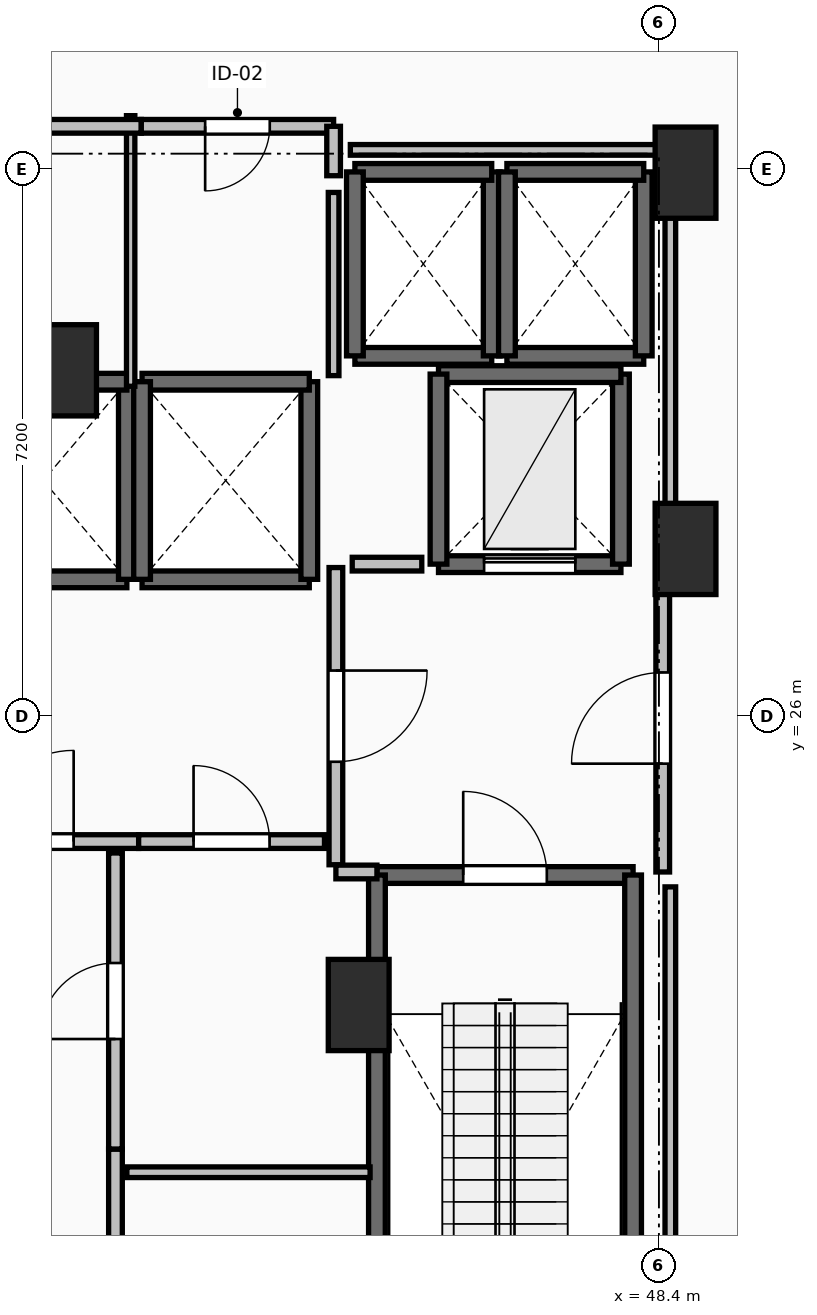
"""IFC4 building model, lengths in metres.
Left out: names, types, materials, properties, quantities, classifications, styles, units other than length and angle.
Written with IfcOpenShell. Run it as: python <this file> out.ifc"""

import sys

from ifc_helpers import new_model, si_unit, direction, frame, frame_2d, origin, origin_2d, place, context, subcontext, project, spatial, rectangle, extrude, element, fill, save


model = new_model("IFC4")
c1 = context("Model", 3, precision=1e-05, world=origin(), true_north=direction((0.0, 1.0)))
c2 = subcontext(c1, "Body", "Model", "MODEL_VIEW")
j1 = project(units=[si_unit("LENGTHUNIT", "METRE"), si_unit("PLANEANGLEUNIT", "RADIAN")], contexts=[c1])
p1 = place(None, origin())
s1 = spatial("IfcSite", under=j1, at=p1, CompositionType="ELEMENT")
p2 = place(p1, origin())
s2 = spatial("IfcBuilding", under=s1, at=p2, CompositionType="ELEMENT")
p3 = place(p2, frame((0.0, 0.0, 9.6)))
s3 = spatial("IfcBuildingStorey", under=s2, at=p3, CompositionType="ELEMENT", Elevation=9.6)
for number, where, z_axis, x_axis in (
    (1, (48.75, 33.15, 0.0), (0.0, 0.0, 1.0), (1.0, 0.0, 0.0)),
    (2, (48.75, 28.2, 0.0), (0.0, 0.0, 1.0), (1.0, 0.0, 0.0)),
    (3, (44.45, 22.2, 0.0), (0.0, 0.0, 1.0), (1.0, 0.0, 0.0)),
    (4, (40.6, 30.55, 0.0), (0.0, 0.0, 1.0), (1.0, 0.0, 0.0)),
):
    element("IfcColumn", number, at=place(p3, frame(where, z_axis=z_axis, x_axis=x_axis)), inside=s3, PredefinedType="PILASTER", context=c2, shape_type="SweptSolid", body=[
        extrude(rectangle(XDim=0.8, YDim=1.2, at=origin_2d()), origin(), (0.0, 0.0, 1.0), 4.8),
    ])
p4 = place(p3, frame((44.69, 23.91, 0.0), z_axis=(0.0, 0.0, 1.0), x_axis=(1.0, 0.0, 0.0)))
e5 = element("IfcWall", 5, at=p4, inside=s3, PredefinedType="SOLIDWALL", context=c2, shape_type="SweptSolid", body=[
    extrude(rectangle(XDim=3.37, YDim=0.22, at=frame_2d((1.685, 0.0))), origin(), (0.0, 0.0, 1.0), 4.48),
])
p5 = place(p4, frame((1.135, 0.0, 0.0)))
e6 = element("IfcOpeningElement", 6, at=p5, cuts=e5, PredefinedType="OPENING", context=c2, shape_type="SweptSolid", body=[
    extrude(rectangle(XDim=1.1, YDim=2.15, at=frame_2d((0.55, 1.075))), frame((0.0, 0.125, 0.0), z_axis=(0.0, -1.0, 0.0), x_axis=(1.0, 0.0, 0.0)), (0.0, 0.0, 1.0), 0.25),
])
for number, where, z_axis, x_axis in (
    (7, (48.06, 23.91, 0.0), (0.0, 0.0, 1.0), (0.0, -1.0, 0.0)),
    (8, (44.69, 16.49, 0.0), (0.0, 0.0, 1.0), (0.0, 1.0, 0.0)),
):
    element("IfcWall", number, at=place(p3, frame(where, z_axis=z_axis, x_axis=x_axis)), inside=s3, PredefinedType="SOLIDWALL", context=c2, shape_type="SweptSolid", body=[
        extrude(rectangle(XDim=7.42, YDim=0.22, at=frame_2d((3.71, 0.0))), origin(), (0.0, 0.0, 1.0), 4.48),
    ])
p6 = place(p3, frame((39.2, 27.8, 0.0), z_axis=(0.0, 0.0, 1.0), x_axis=(1.0, 0.0, 0.0)))
e9 = element("IfcWall", 9, at=p6, inside=s3, PredefinedType="SOLIDWALL", context=c2, shape_type="SweptSolid", body=[
    extrude(rectangle(XDim=2.2, YDim=0.22, at=frame_2d((1.1, 0.0))), origin(), (0.0, 0.0, 1.0), 4.48),
])
p7 = place(p3, frame((41.4, 27.8, 0.0), z_axis=(0.0, 0.0, 1.0), x_axis=(0.0, 1.0, 0.0)))
e10 = element("IfcWall", 10, at=p7, inside=s3, PredefinedType="SOLIDWALL", context=c2, shape_type="SweptSolid", body=[
    extrude(rectangle(XDim=2.6, YDim=0.22, at=frame_2d((1.3, 0.0))), origin(), (0.0, 0.0, 1.0), 4.48),
])
for number, where, z_axis, x_axis in (
    (11, (41.4, 30.4, 0.0), (0.0, 0.0, 1.0), (-1.0, 0.0, 0.0)),
    (12, (41.6, 27.8, 0.0), (0.0, 0.0, 1.0), (1.0, 0.0, 0.0)),
):
    element("IfcWall", number, at=place(p3, frame(where, z_axis=z_axis, x_axis=x_axis)), inside=s3, PredefinedType="SOLIDWALL", context=c2, shape_type="SweptSolid", body=[
        extrude(rectangle(XDim=2.2, YDim=0.22, at=frame_2d((1.1, 0.0))), origin(), (0.0, 0.0, 1.0), 4.48),
    ])
p8 = place(p3, frame((43.8, 27.8, 0.0), z_axis=(0.0, 0.0, 1.0), x_axis=(0.0, 1.0, 0.0)))
e13 = element("IfcWall", 13, at=p8, inside=s3, PredefinedType="SOLIDWALL", context=c2, shape_type="SweptSolid", body=[
    extrude(rectangle(XDim=2.6, YDim=0.22, at=frame_2d((1.3, 0.0))), origin(), (0.0, 0.0, 1.0), 4.48),
])
p9 = place(p3, frame((43.8, 30.4, 0.0), z_axis=(0.0, 0.0, 1.0), x_axis=(-1.0, 0.0, 0.0)))
e14 = element("IfcWall", 14, at=p9, inside=s3, PredefinedType="SOLIDWALL", context=c2, shape_type="SweptSolid", body=[
    extrude(rectangle(XDim=2.2, YDim=0.22, at=frame_2d((1.1, 0.0))), origin(), (0.0, 0.0, 1.0), 4.48),
])
p10 = place(p3, frame((41.6, 30.4, 0.0), z_axis=(0.0, 0.0, 1.0), x_axis=(0.0, -1.0, 0.0)))
e15 = element("IfcWall", 15, at=p10, inside=s3, PredefinedType="SOLIDWALL", context=c2, shape_type="SweptSolid", body=[
    extrude(rectangle(XDim=2.6, YDim=0.22, at=frame_2d((1.3, 0.0))), origin(), (0.0, 0.0, 1.0), 4.48),
])
p11 = place(p3, frame((44.4, 30.74, 0.0), z_axis=(0.0, 0.0, 1.0), x_axis=(1.0, 0.0, 0.0)))
e16 = element("IfcWall", 16, at=p11, inside=s3, PredefinedType="SOLIDWALL", context=c2, shape_type="SweptSolid", body=[
    extrude(rectangle(XDim=1.8, YDim=0.22, at=frame_2d((0.9, 0.0))), origin(), (0.0, 0.0, 1.0), 4.48),
])
p12 = place(p3, frame((46.2, 30.74, 0.0), z_axis=(0.0, 0.0, 1.0), x_axis=(0.0, 1.0, 0.0)))
e17 = element("IfcWall", 17, at=p12, inside=s3, PredefinedType="SOLIDWALL", context=c2, shape_type="SweptSolid", body=[
    extrude(rectangle(XDim=2.42, YDim=0.22, at=frame_2d((1.21, 0.0))), origin(), (0.0, 0.0, 1.0), 4.48),
])
p13 = place(p3, frame((46.2, 33.16, 0.0), z_axis=(0.0, 0.0, 1.0), x_axis=(-1.0, 0.0, 0.0)))
e18 = element("IfcWall", 18, at=p13, inside=s3, PredefinedType="SOLIDWALL", context=c2, shape_type="SweptSolid", body=[
    extrude(rectangle(XDim=1.8, YDim=0.22, at=frame_2d((0.9, 0.0))), origin(), (0.0, 0.0, 1.0), 4.48),
])
p14 = place(p3, frame((44.4, 33.16, 0.0), z_axis=(0.0, 0.0, 1.0), x_axis=(0.0, -1.0, 0.0)))
e19 = element("IfcWall", 19, at=p14, inside=s3, PredefinedType="SOLIDWALL", context=c2, shape_type="SweptSolid", body=[
    extrude(rectangle(XDim=2.42, YDim=0.22, at=frame_2d((1.21, 0.0))), origin(), (0.0, 0.0, 1.0), 4.48),
])
p15 = place(p3, frame((46.4, 30.74, 0.0), z_axis=(0.0, 0.0, 1.0), x_axis=(1.0, 0.0, 0.0)))
e20 = element("IfcWall", 20, at=p15, inside=s3, PredefinedType="SOLIDWALL", context=c2, shape_type="SweptSolid", body=[
    extrude(rectangle(XDim=1.8, YDim=0.22, at=frame_2d((0.9, 0.0))), origin(), (0.0, 0.0, 1.0), 4.48),
])
p16 = place(p3, frame((48.2, 30.74, 0.0), z_axis=(0.0, 0.0, 1.0), x_axis=(0.0, 1.0, 0.0)))
e21 = element("IfcWall", 21, at=p16, inside=s3, PredefinedType="SOLIDWALL", context=c2, shape_type="SweptSolid", body=[
    extrude(rectangle(XDim=2.42, YDim=0.22, at=frame_2d((1.21, 0.0))), origin(), (0.0, 0.0, 1.0), 4.48),
])
p17 = place(p3, frame((48.2, 33.16, 0.0), z_axis=(0.0, 0.0, 1.0), x_axis=(-1.0, 0.0, 0.0)))
e22 = element("IfcWall", 22, at=p17, inside=s3, PredefinedType="SOLIDWALL", context=c2, shape_type="SweptSolid", body=[
    extrude(rectangle(XDim=1.8, YDim=0.22, at=frame_2d((0.9, 0.0))), origin(), (0.0, 0.0, 1.0), 4.48),
])
p18 = place(p3, frame((46.4, 33.16, 0.0), z_axis=(0.0, 0.0, 1.0), x_axis=(0.0, -1.0, 0.0)))
e23 = element("IfcWall", 23, at=p18, inside=s3, PredefinedType="SOLIDWALL", context=c2, shape_type="SweptSolid", body=[
    extrude(rectangle(XDim=2.42, YDim=0.22, at=frame_2d((1.21, 0.0))), origin(), (0.0, 0.0, 1.0), 4.48),
])
p19 = place(p3, frame((45.5, 28.0, 0.0), z_axis=(0.0, 0.0, 1.0), x_axis=(1.0, 0.0, 0.0)))
e24 = element("IfcWall", 24, at=p19, inside=s3, PredefinedType="SHEAR", context=c2, shape_type="SweptSolid", body=[
    extrude(rectangle(XDim=2.4, YDim=0.22, at=frame_2d((1.2, 0.0))), origin(), (0.0, 0.0, 1.0), 4.48),
])
p20 = place(p19, frame((0.6, 0.0, 0.0)))
e25 = element("IfcOpeningElement", 25, at=p20, cuts=e24, PredefinedType="OPENING", context=c2, shape_type="SweptSolid", body=[
    extrude(rectangle(XDim=1.2, YDim=2.2, at=frame_2d((0.6, 1.1))), frame((0.0, 0.125, 0.0), z_axis=(0.0, -1.0, 0.0), x_axis=(1.0, 0.0, 0.0)), (0.0, 0.0, 1.0), 0.25),
])
p21 = place(p3, frame((47.9, 28.0, 0.0), z_axis=(0.0, 0.0, 1.0), x_axis=(0.0, 1.0, 0.0)))
e26 = element("IfcWall", 26, at=p21, inside=s3, PredefinedType="SHEAR", context=c2, shape_type="SweptSolid", body=[
    extrude(rectangle(XDim=2.5, YDim=0.22, at=frame_2d((1.25, 0.0))), origin(), (0.0, 0.0, 1.0), 4.48),
])
p22 = place(p3, frame((47.9, 30.5, 0.0), z_axis=(0.0, 0.0, 1.0), x_axis=(-1.0, 0.0, 0.0)))
e27 = element("IfcWall", 27, at=p22, inside=s3, PredefinedType="SHEAR", context=c2, shape_type="SweptSolid", body=[
    extrude(rectangle(XDim=2.4, YDim=0.22, at=frame_2d((1.2, 0.0))), origin(), (0.0, 0.0, 1.0), 4.48),
])
p23 = place(p3, frame((45.5, 30.5, 0.0), z_axis=(0.0, 0.0, 1.0), x_axis=(0.0, -1.0, 0.0)))
e28 = element("IfcWall", 28, at=p23, inside=s3, PredefinedType="SHEAR", context=c2, shape_type="SweptSolid", body=[
    extrude(rectangle(XDim=2.5, YDim=0.22, at=frame_2d((1.25, 0.0))), origin(), (0.0, 0.0, 1.0), 4.48),
])
p24 = place(p3, frame((44.15, 27.955, 0.0), z_axis=(0.0, 0.0, 1.0), x_axis=(0.0, -1.0, 0.0)))
e29 = element("IfcWall", 29, at=p24, inside=s3, PredefinedType="PARTITIONING", context=c2, shape_type="SweptSolid", body=[
    extrude(rectangle(XDim=3.91, YDim=0.18, at=frame_2d((1.955, 0.0))), origin(), (0.0, 0.0, 1.0), 4.48),
])
p25 = place(p24, frame((1.355, 0.0, 0.0)))
e30 = element("IfcOpeningElement", 30, at=p25, cuts=e29, PredefinedType="OPENING", context=c2, shape_type="SweptSolid", body=[
    extrude(rectangle(XDim=1.2, YDim=2.15, at=frame_2d((0.6, 1.075))), frame((0.0, 0.105, 0.0), z_axis=(0.0, -1.0, 0.0), x_axis=(1.0, 0.0, 0.0)), (0.0, 0.0, 1.0), 0.21),
])
p26 = place(p3, frame((44.15, 23.95, 0.0), z_axis=(0.0, 0.0, 1.0), x_axis=(1.0, 0.0, 0.0)))
e31 = element("IfcWall", 31, at=p26, inside=s3, PredefinedType="PARTITIONING", context=c2, shape_type="SweptSolid", body=[
    extrude(rectangle(XDim=0.54, YDim=0.18, at=frame_2d((0.27, 0.0))), origin(), (0.0, 0.0, 1.0), 4.48),
])
p27 = place(p3, frame((48.45, 23.95, 0.0), z_axis=(0.0, 0.0, 1.0), x_axis=(0.0, 1.0, 0.0)))
e32 = element("IfcWall", 32, at=p27, inside=s3, PredefinedType="PARTITIONING", context=c2, shape_type="SweptSolid", body=[
    extrude(rectangle(XDim=4.05, YDim=0.18, at=frame_2d((2.025, 0.0))), origin(), (0.0, 0.0, 1.0), 4.48),
])
p28 = place(p27, frame((1.425, 0.0, 0.0)))
e33 = element("IfcOpeningElement", 33, at=p28, cuts=e32, PredefinedType="OPENING", context=c2, shape_type="SweptSolid", body=[
    extrude(rectangle(XDim=1.2, YDim=2.15, at=frame_2d((0.6, 1.075))), frame((0.0, 0.105, 0.0), z_axis=(0.0, -1.0, 0.0), x_axis=(1.0, 0.0, 0.0)), (0.0, 0.0, 1.0), 0.21),
])
p29 = place(p3, frame((38.645, 24.35, 0.0), z_axis=(0.0, 0.0, 1.0), x_axis=(1.0, 0.0, 0.0)))
e34 = element("IfcWall", 34, at=p29, inside=s3, PredefinedType="PARTITIONING", context=c2, shape_type="SweptSolid", body=[
    extrude(rectangle(XDim=2.91, YDim=0.18, at=frame_2d((1.455, 0.0))), origin(), (0.0, 0.0, 1.0), 4.48),
])
p30 = place(p29, frame((0.855, 0.0, 0.0)))
e35 = element("IfcOpeningElement", 35, at=p30, cuts=e34, PredefinedType="OPENING", context=c2, shape_type="SweptSolid", body=[
    extrude(rectangle(XDim=1.2, YDim=2.15, at=frame_2d((0.6, 1.075))), frame((0.0, 0.105, 0.0), z_axis=(0.0, -1.0, 0.0), x_axis=(1.0, 0.0, 0.0)), (0.0, 0.0, 1.0), 0.21),
])
p31 = place(p3, frame((41.555, 24.35, 0.0), z_axis=(0.0, 0.0, 1.0), x_axis=(1.0, 0.0, 0.0)))
e36 = element("IfcWall", 36, at=p31, inside=s3, PredefinedType="PARTITIONING", context=c2, shape_type="SweptSolid", body=[
    extrude(rectangle(XDim=2.445, YDim=0.18, at=frame_2d((1.223, 0.0))), origin(), (0.0, 0.0, 1.0), 4.48),
])
p32 = place(p31, frame((0.722, 0.0, 0.0)))
e37 = element("IfcOpeningElement", 37, at=p32, cuts=e36, PredefinedType="OPENING", context=c2, shape_type="SweptSolid", body=[
    extrude(rectangle(XDim=1.0, YDim=2.15, at=frame_2d((0.5, 1.075))), frame((0.0, 0.105, 0.0), z_axis=(0.0, -1.0, 0.0), x_axis=(1.0, 0.0, 0.0)), (0.0, 0.0, 1.0), 0.21),
])
p33 = place(p3, frame((41.25, 16.32, 0.0), z_axis=(0.0, 0.0, 1.0), x_axis=(0.0, 1.0, 0.0)))
e38 = element("IfcWall", 38, at=p33, inside=s3, PredefinedType="PARTITIONING", context=c2, shape_type="SweptSolid", body=[
    extrude(rectangle(XDim=3.985, YDim=0.18, at=frame_2d((1.992, 0.0))), origin(), (0.0, 0.0, 1.0), 4.48),
])
p34 = place(p33, frame((1.593, 0.0, 0.0)))
e39 = element("IfcOpeningElement", 39, at=p34, cuts=e38, PredefinedType="OPENING", context=c2, shape_type="SweptSolid", body=[
    extrude(rectangle(XDim=0.8, YDim=2.05, at=frame_2d((0.4, 1.025))), frame((0.0, 0.105, 0.0), z_axis=(0.0, -1.0, 0.0), x_axis=(1.0, 0.0, 0.0)), (0.0, 0.0, 1.0), 0.21),
])
p35 = place(p3, frame((41.25, 20.305, 0.0), z_axis=(0.0, 0.0, 1.0), x_axis=(0.0, 1.0, 0.0)))
e40 = element("IfcWall", 40, at=p35, inside=s3, PredefinedType="PARTITIONING", context=c2, shape_type="SweptSolid", body=[
    extrude(rectangle(XDim=3.895, YDim=0.18, at=frame_2d((1.948, 0.0))), origin(), (0.0, 0.0, 1.0), 4.48),
])
p36 = place(p35, frame((1.448, 0.0, 0.0)))
e41 = element("IfcOpeningElement", 41, at=p36, cuts=e40, PredefinedType="OPENING", context=c2, shape_type="SweptSolid", body=[
    extrude(rectangle(XDim=1.0, YDim=2.15, at=frame_2d((0.5, 1.075))), frame((0.0, 0.105, 0.0), z_axis=(0.0, -1.0, 0.0), x_axis=(1.0, 0.0, 0.0)), (0.0, 0.0, 1.0), 0.21),
])
p37 = place(p3, frame((44.6, 20.0, 0.0), z_axis=(0.0, 0.0, 1.0), x_axis=(-1.0, 0.0, 0.0)))
e42 = element("IfcWall", 42, at=p37, inside=s3, PredefinedType="PARTITIONING", context=c2, shape_type="SweptSolid", body=[
    extrude(rectangle(XDim=3.2, YDim=0.14, at=frame_2d((1.6, 0.0))), origin(), (0.0, 0.0, 1.0), 4.48),
])
p38 = place(p3, frame((41.45, 30.34, 0.0), z_axis=(0.0, 0.0, 1.0), x_axis=(0.0, 1.0, 0.0)))
e43 = element("IfcWall", 43, at=p38, inside=s3, PredefinedType="PARTITIONING", context=c2, shape_type="SweptSolid", body=[
    extrude(rectangle(XDim=3.56, YDim=0.11, at=frame_2d((1.78, 0.0))), origin(), (0.0, 0.0, 1.0), 4.48),
])
p39 = place(p3, frame((41.59, 33.76, 0.0), z_axis=(0.0, 0.0, 1.0), x_axis=(-1.0, 0.0, 0.0)))
e44 = element("IfcWall", 44, at=p39, inside=s3, PredefinedType="PARTITIONING", context=c2, shape_type="SweptSolid", body=[
    extrude(rectangle(XDim=3.44, YDim=0.18, at=frame_2d((1.72, 0.0))), origin(), (0.0, 0.0, 1.0), 4.48),
])
p40 = place(p39, frame((1.295, 0.0, 0.0)))
e45 = element("IfcOpeningElement", 45, at=p40, cuts=e44, PredefinedType="OPENING", context=c2, shape_type="SweptSolid", body=[
    extrude(rectangle(XDim=0.85, YDim=2.1, at=frame_2d((0.425, 1.05))), frame((0.0, 0.105, 0.0), z_axis=(0.0, -1.0, 0.0), x_axis=(1.0, 0.0, 0.0)), (0.0, 0.0, 1.0), 0.21),
])
p41 = place(p3, frame((44.12, 33.76, 0.0), z_axis=(0.0, 0.0, 1.0), x_axis=(-1.0, 0.0, 0.0)))
e46 = element("IfcWall", 46, at=p41, inside=s3, PredefinedType="PARTITIONING", context=c2, shape_type="SweptSolid", body=[
    extrude(rectangle(XDim=2.53, YDim=0.18, at=frame_2d((1.265, 0.0))), origin(), (0.0, 0.0, 1.0), 4.48),
])
p42 = place(p41, frame((0.84, 0.0, 0.0)))
e47 = element("IfcOpeningElement", 47, at=p42, cuts=e46, PredefinedType="OPENING", context=c2, shape_type="SweptSolid", body=[
    extrude(rectangle(XDim=0.85, YDim=2.1, at=frame_2d((0.425, 1.05))), frame((0.0, 0.105, 0.0), z_axis=(0.0, -1.0, 0.0), x_axis=(1.0, 0.0, 0.0)), (0.0, 0.0, 1.0), 0.21),
])
p43 = place(p3, frame((44.12, 33.11, 0.0), z_axis=(0.0, 0.0, 1.0), x_axis=(0.0, 1.0, 0.0)))
e48 = element("IfcWall", 48, at=p43, inside=s3, PredefinedType="PARTITIONING", context=c2, shape_type="SweptSolid", body=[
    extrude(rectangle(XDim=0.65, YDim=0.18, at=frame_2d((0.325, 0.0))), origin(), (0.0, 0.0, 1.0), 4.48),
])
p44 = place(p3, frame((45.28, 28.0, 0.0), z_axis=(0.0, 0.0, 1.0), x_axis=(-1.0, 0.0, 0.0)))
e49 = element("IfcWall", 49, at=p44, inside=s3, PredefinedType="PARTITIONING", context=c2, shape_type="SweptSolid", body=[
    extrude(rectangle(XDim=0.915, YDim=0.18, at=frame_2d((0.458, 0.0))), origin(), (0.0, 0.0, 1.0), 4.48),
])
p45 = place(p3, frame((44.12, 30.48, 0.0), z_axis=(0.0, 0.0, 1.0), x_axis=(0.0, 1.0, 0.0)))
e50 = element("IfcWall", 50, at=p45, inside=s3, PredefinedType="PARTITIONING", context=c2, shape_type="SweptSolid", body=[
    extrude(rectangle(XDim=2.41, YDim=0.14, at=frame_2d((1.205, 0.0))), origin(), (0.0, 0.0, 1.0), 4.48),
])
p46 = place(p3, frame((44.34, 33.45, 0.0), z_axis=(0.0, 0.0, 1.0), x_axis=(1.0, 0.0, 0.0)))
e51 = element("IfcWall", 51, at=p46, inside=s3, PredefinedType="PARTITIONING", context=c2, shape_type="SweptSolid", body=[
    extrude(rectangle(XDim=4.21, YDim=0.14, at=frame_2d((2.105, 0.0))), origin(), (0.0, 0.0, 1.0), 3.672),
])
p47 = place(p3, frame((48.55, 33.45, 0.0), z_axis=(0.0, 0.0, 1.0), x_axis=(0.0, -1.0, 0.0)))
e52 = element("IfcWall", 52, at=p47, inside=s3, PredefinedType="PARTITIONING", context=c2, shape_type="SweptSolid", body=[
    extrude(rectangle(XDim=5.254, YDim=0.14, at=frame_2d((2.627, 0.0))), origin(), (0.0, 0.0, 1.0), 3.672),
])
p48 = place(p3, frame((48.55, 23.754, 0.0), z_axis=(0.0, 0.0, 1.0), x_axis=(0.0, -1.0, 0.0)))
e53 = element("IfcWall", 53, at=p48, inside=s3, PredefinedType="PARTITIONING", context=c2, shape_type="SweptSolid", body=[
    extrude(rectangle(XDim=7.514, YDim=0.14, at=frame_2d((3.757, 0.0))), origin(), (0.0, 0.0, 1.0), 2.406),
])
p49 = place(p5, origin())
e54 = element("IfcDoor", 54, at=p49, inside=s3, OperationType="SINGLE_SWING_LEFT", PredefinedType="DOOR", context=c2, shape_type="SweptSolid", body=[
    extrude(rectangle(XDim=1.1, YDim=2.15, at=frame_2d((0.55, 1.075))), frame((0.0, 0.025, 0.0), z_axis=(0.0, -1.0, 0.0), x_axis=(1.0, 0.0, 0.0)), (0.0, 0.0, 1.0), 0.05),
])
fill(e6, e54)
p50 = place(p20, origin())
e55 = element("IfcDoor", 55, at=p50, inside=s3, OperationType="SLIDING_TO_LEFT", PredefinedType="DOOR", context=c2, shape_type="SweptSolid", body=[
    extrude(rectangle(XDim=1.2, YDim=2.2, at=frame_2d((0.6, 1.1))), frame((0.0, 0.025, 0.0), z_axis=(0.0, -1.0, 0.0), x_axis=(1.0, 0.0, 0.0)), (0.0, 0.0, 1.0), 0.05),
])
fill(e25, e55)
p51 = place(p25, origin())
e56 = element("IfcDoor", 56, at=p51, inside=s3, OperationType="SINGLE_SWING_LEFT", PredefinedType="DOOR", context=c2, shape_type="SweptSolid", body=[
    extrude(rectangle(XDim=1.2, YDim=2.15, at=frame_2d((0.6, 1.075))), frame((0.0, 0.025, 0.0), z_axis=(0.0, -1.0, 0.0), x_axis=(1.0, 0.0, 0.0)), (0.0, 0.0, 1.0), 0.05),
])
fill(e30, e56)
p52 = place(p28, origin())
e57 = element("IfcDoor", 57, at=p52, inside=s3, OperationType="SINGLE_SWING_LEFT", PredefinedType="DOOR", context=c2, shape_type="SweptSolid", body=[
    extrude(rectangle(XDim=1.2, YDim=2.15, at=frame_2d((0.6, 1.075))), frame((0.0, 0.025, 0.0), z_axis=(0.0, -1.0, 0.0), x_axis=(1.0, 0.0, 0.0)), (0.0, 0.0, 1.0), 0.05),
])
fill(e33, e57)
p53 = place(p30, origin())
e58 = element("IfcDoor", 58, at=p53, inside=s3, OperationType="SINGLE_SWING_RIGHT", PredefinedType="DOOR", context=c2, shape_type="SweptSolid", body=[
    extrude(rectangle(XDim=1.2, YDim=2.15, at=frame_2d((0.6, 1.075))), frame((0.0, 0.025, 0.0), z_axis=(0.0, -1.0, 0.0), x_axis=(1.0, 0.0, 0.0)), (0.0, 0.0, 1.0), 0.05),
])
fill(e35, e58)
p54 = place(p32, origin())
e59 = element("IfcDoor", 59, at=p54, inside=s3, OperationType="SINGLE_SWING_LEFT", PredefinedType="DOOR", context=c2, shape_type="SweptSolid", body=[
    extrude(rectangle(XDim=1.0, YDim=2.15, at=frame_2d((0.5, 1.075))), frame((0.0, 0.025, 0.0), z_axis=(0.0, -1.0, 0.0), x_axis=(1.0, 0.0, 0.0)), (0.0, 0.0, 1.0), 0.05),
])
fill(e37, e59)
p55 = place(p36, origin())
e60 = element("IfcDoor", 60, at=p55, inside=s3, OperationType="SINGLE_SWING_LEFT", PredefinedType="DOOR", context=c2, shape_type="SweptSolid", body=[
    extrude(rectangle(XDim=1.0, YDim=2.15, at=frame_2d((0.5, 1.075))), frame((0.0, 0.025, 0.0), z_axis=(0.0, -1.0, 0.0), x_axis=(1.0, 0.0, 0.0)), (0.0, 0.0, 1.0), 0.05),
])
fill(e41, e60)
p56 = place(p42, origin())
e61 = element("IfcDoor", 61, at=p56, inside=s3, OperationType="SINGLE_SWING_RIGHT", PredefinedType="DOOR", context=c2, shape_type="SweptSolid", body=[
    extrude(rectangle(XDim=0.85, YDim=2.1, at=frame_2d((0.425, 1.05))), frame((0.0, 0.025, 0.0), z_axis=(0.0, -1.0, 0.0), x_axis=(1.0, 0.0, 0.0)), (0.0, 0.0, 1.0), 0.05),
])
fill(e47, e61)
save(model, sys.argv[1])
